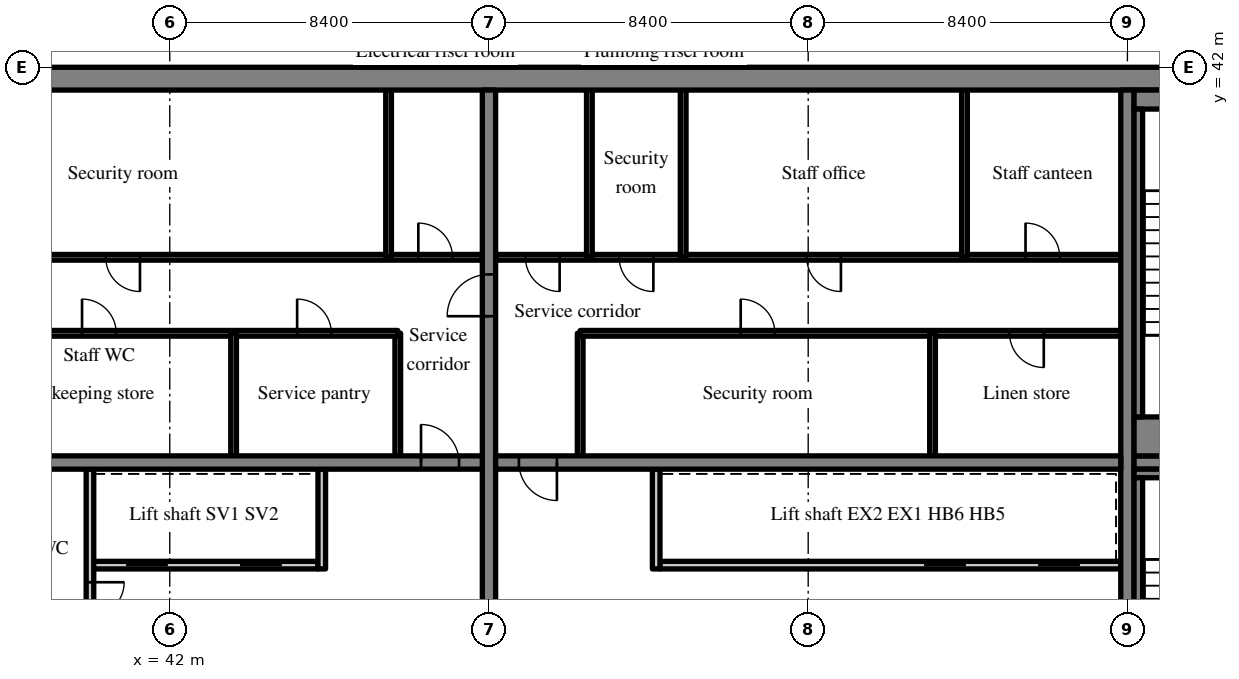
"""IFC4 building model, lengths in metres.
Left out: names, types, materials, properties, quantities, classifications, styles, units other than length and angle.
Written with IfcOpenShell. Run it as: python <this file> out.ifc"""

import sys

from ifc_helpers import new_model, si_unit, direction, frame, frame_2d, origin, place, context, subcontext, project, spatial, rectangle, extrude, source, transform, mapped, element, fill, save


model = new_model("IFC4")
c1 = context("Model", 3, precision=1e-05, world=origin(), true_north=direction((0.0, 1.0)))
c2 = subcontext(c1, "Body", "Model", "MODEL_VIEW")
j1 = project(units=[si_unit("LENGTHUNIT", "METRE"), si_unit("PLANEANGLEUNIT", "RADIAN")], contexts=[c1])
p1 = place(None, origin())
s1 = spatial("IfcSite", under=j1, at=p1, CompositionType="ELEMENT")
p2 = place(p1, origin())
s2 = spatial("IfcBuilding", under=s1, at=p2, CompositionType="ELEMENT")
p3 = place(p2, frame((0.0, 0.0, 237.4)))
s3 = spatial("IfcBuildingStorey", under=s2, at=p3, CompositionType="ELEMENT", Elevation=237.4)
m1 = source(origin(), c2, "Body", "SweptSolid", [
    extrude(rectangle(XDim=50.4, YDim=0.6, at=frame_2d((25.2, 0.0))), origin(), (0.0, 0.0, 1.0), 3.62),
])
p4 = place(p3, frame((25.2, 41.7, 0.0), z_axis=(0.0, 0.0, 1.0), x_axis=(1.0, 0.0, 0.0)))
e1 = element("IfcWall", 1, at=p4, inside=s3, PredefinedType="SHEAR", context=c2, shape_type="MappedRepresentation", body=[
    mapped(m1, transform((0.0, 0.0, 0.0), scale=1.0)),
])
m2 = source(origin(), c2, "Body", "SweptSolid", [
    extrude(rectangle(XDim=18.8, YDim=0.35, at=frame_2d((9.4, 0.0))), origin(), (0.0, 0.0, 1.0), 3.62),
])
p5 = place(p3, frame((50.4, 22.6, 0.0), z_axis=(0.0, 0.0, 1.0), x_axis=(0.0, 1.0, 0.0)))
e2 = element("IfcWall", 2, at=p5, inside=s3, PredefinedType="SHEAR", context=c2, shape_type="MappedRepresentation", body=[
    mapped(m2, transform((0.0, 0.0, 0.0), scale=1.0)),
])
m3 = source(origin(), c2, "Body", "SweptSolid", [
    extrude(rectangle(XDim=1.1, YDim=2.1, at=frame_2d((0.55, 1.05))), frame((0.0, 0.185, 0.0), z_axis=(0.0, -1.0, 0.0), x_axis=(1.0, 0.0, 0.0)), (0.0, 0.0, 1.0), 0.37),
])
p6 = place(p5, frame((12.85, 0.0, 0.0)))
e3 = element("IfcOpeningElement", 3, at=p6, cuts=e2, PredefinedType="OPENING", context=c2, shape_type="MappedRepresentation", body=[
    mapped(m3, transform((0.0, 0.0, 0.0), scale=1.0)),
])
p7 = place(p3, frame((67.2, 22.6, 0.0), z_axis=(0.0, 0.0, 1.0), x_axis=(0.0, 1.0, 0.0)))
e4 = element("IfcWall", 4, at=p7, inside=s3, PredefinedType="SHEAR", context=c2, shape_type="MappedRepresentation", body=[
    mapped(m2, transform((0.0, 0.0, 0.0), scale=1.0)),
])
m4 = source(origin(), c2, "Body", "SweptSolid", [
    extrude(rectangle(XDim=16.45, YDim=0.35, at=frame_2d((8.225, 0.0))), origin(), (0.0, 0.0, 1.0), 3.62),
])
p8 = place(p3, frame((33.775, 31.6, 0.0), z_axis=(0.0, 0.0, 1.0), x_axis=(1.0, 0.0, 0.0)))
e5 = element("IfcWall", 5, at=p8, inside=s3, PredefinedType="SHEAR", context=c2, shape_type="MappedRepresentation", body=[
    mapped(m4, transform((0.0, 0.0, 0.0), scale=1.0)),
])
m5 = source(origin(), c2, "Body", "SweptSolid", [
    extrude(rectangle(XDim=1.0, YDim=2.1, at=frame_2d((0.5, 1.05))), frame((0.0, 0.185, 0.0), z_axis=(0.0, -1.0, 0.0), x_axis=(1.0, 0.0, 0.0)), (0.0, 0.0, 1.0), 0.37),
])
p9 = place(p8, frame((14.837, 0.0, 0.0)))
e6 = element("IfcOpeningElement", 6, at=p9, cuts=e5, PredefinedType="OPENING", context=c2, shape_type="MappedRepresentation", body=[
    mapped(m5, transform((0.0, 0.0, 0.0), scale=1.0)),
])
m6 = source(origin(), c2, "Body", "SweptSolid", [
    extrude(rectangle(XDim=16.45, YDim=0.35, at=frame_2d((8.225, 0.0))), origin(), (0.0, 0.0, 1.0), 3.62),
])
p10 = place(p3, frame((50.575, 31.6, 0.0), z_axis=(0.0, 0.0, 1.0), x_axis=(1.0, 0.0, 0.0)))
e7 = element("IfcWall", 7, at=p10, inside=s3, PredefinedType="SHEAR", context=c2, shape_type="MappedRepresentation", body=[
    mapped(m6, transform((0.0, 0.0, 0.0), scale=1.0)),
])
p11 = place(p10, frame((0.613, 0.0, 0.0)))
e8 = element("IfcOpeningElement", 8, at=p11, cuts=e7, PredefinedType="OPENING", context=c2, shape_type="MappedRepresentation", body=[
    mapped(m5, transform((0.0, 0.0, 0.0), scale=1.0)),
])
m7 = source(origin(), c2, "Body", "SweptSolid", [
    extrude(rectangle(XDim=7.625, YDim=0.35, at=frame_2d((3.812, 0.0))), origin(), (0.0, 0.0, 1.0), 3.62),
])
p12 = place(p3, frame((67.375, 31.6, 0.0), z_axis=(0.0, 0.0, 1.0), x_axis=(1.0, 0.0, 0.0)))
e9 = element("IfcWall", 9, at=p12, inside=s3, PredefinedType="SHEAR", context=c2, shape_type="MappedRepresentation", body=[
    mapped(m7, transform((0.0, 0.0, 0.0), scale=1.0)),
])
p13 = place(p12, frame((5.8, 0.0, 0.0)))
e10 = element("IfcOpeningElement", 10, at=p13, cuts=e9, PredefinedType="OPENING", context=c2, shape_type="MappedRepresentation", body=[
    mapped(m3, transform((0.0, 0.0, 0.0), scale=1.0)),
])
m8 = source(origin(), c2, "Body", "SweptSolid", [
    extrude(rectangle(XDim=6.0, YDim=0.2, at=frame_2d((3.0, 0.0))), origin(), (0.0, 0.0, 1.0), 3.62),
])
p14 = place(p3, frame((39.9, 28.9, 0.0), z_axis=(0.0, 0.0, 1.0), x_axis=(1.0, 0.0, 0.0)))
e11 = element("IfcWall", 11, at=p14, inside=s3, PredefinedType="SOLIDWALL", context=c2, shape_type="MappedRepresentation", body=[
    mapped(m8, transform((0.0, 0.0, 0.0), scale=1.0)),
])
m9 = source(origin(), c2, "Body", "SweptSolid", [
    extrude(rectangle(XDim=1.1, YDim=2.1, at=frame_2d((0.55, 1.05))), frame((0.0, 0.11, 0.0), z_axis=(0.0, -1.0, 0.0), x_axis=(1.0, 0.0, 0.0)), (0.0, 0.0, 1.0), 0.22),
])
p15 = place(p14, frame((0.95, 0.0, 0.0)))
e12 = element("IfcOpeningElement", 12, at=p15, cuts=e11, PredefinedType="OPENING", context=c2, shape_type="MappedRepresentation", body=[
    mapped(m9, transform((0.0, 0.0, 0.0), scale=1.0)),
])
p16 = place(p14, frame((3.95, 0.0, 0.0)))
e13 = element("IfcOpeningElement", 13, at=p16, cuts=e11, PredefinedType="OPENING", context=c2, shape_type="MappedRepresentation", body=[
    mapped(m9, transform((0.0, 0.0, 0.0), scale=1.0)),
])
m10 = source(origin(), c2, "Body", "SweptSolid", [
    extrude(rectangle(XDim=8.825, YDim=0.2, at=frame_2d((4.413, 0.0))), origin(), (0.0, 0.0, 1.0), 3.62),
])
p17 = place(p3, frame((39.9, 22.6, 0.0), z_axis=(0.0, 0.0, 1.0), x_axis=(0.0, 1.0, 0.0)))
e14 = element("IfcWall", 14, at=p17, inside=s3, PredefinedType="PARTITIONING", context=c2, shape_type="MappedRepresentation", body=[
    mapped(m10, transform((0.0, 0.0, 0.0), scale=1.0)),
])
m11 = source(origin(), c2, "Body", "SweptSolid", [
    extrude(rectangle(XDim=0.9, YDim=2.1, at=frame_2d((0.45, 1.05))), frame((0.0, 0.11, 0.0), z_axis=(0.0, -1.0, 0.0), x_axis=(1.0, 0.0, 0.0)), (0.0, 0.0, 1.0), 0.22),
])
p18 = place(p17, frame((3.15, 0.0, 0.0)))
e15 = element("IfcOpeningElement", 15, at=p18, cuts=e14, PredefinedType="OPENING", context=c2, shape_type="MappedRepresentation", body=[
    mapped(m11, transform((0.0, 0.0, 0.0), scale=1.0)),
])
p19 = place(p17, frame((4.95, 0.0, 0.0)))
e16 = element("IfcOpeningElement", 16, at=p19, cuts=e14, PredefinedType="OPENING", context=c2, shape_type="MappedRepresentation", body=[
    mapped(m11, transform((0.0, 0.0, 0.0), scale=1.0)),
])
m12 = source(origin(), c2, "Body", "SweptSolid", [
    extrude(rectangle(XDim=2.625, YDim=0.2, at=frame_2d((1.312, 0.0))), origin(), (0.0, 0.0, 1.0), 3.62),
])
p20 = place(p3, frame((46.0, 28.8, 0.0), z_axis=(0.0, 0.0, 1.0), x_axis=(0.0, 1.0, 0.0)))
e17 = element("IfcWall", 17, at=p20, inside=s3, PredefinedType="SOLIDWALL", context=c2, shape_type="MappedRepresentation", body=[
    mapped(m12, transform((0.0, 0.0, 0.0), scale=1.0)),
])
m13 = source(origin(), c2, "Body", "SweptSolid", [
    extrude(rectangle(XDim=3.225, YDim=0.15, at=frame_2d((1.613, 0.0))), origin(), (0.0, 0.0, 1.0), 3.62),
])
p21 = place(p3, frame((48.0, 31.775, 0.0), z_axis=(0.0, 0.0, 1.0), x_axis=(0.0, 1.0, 0.0)))
e18 = element("IfcWall", 18, at=p21, inside=s3, PredefinedType="PARTITIONING", context=c2, shape_type="MappedRepresentation", body=[
    mapped(m13, transform((0.0, 0.0, 0.0), scale=1.0)),
])
m14 = source(origin(), c2, "Body", "SweptSolid", [
    extrude(rectangle(XDim=14.225, YDim=0.15, at=frame_2d((7.113, 0.0))), origin(), (0.0, 0.0, 1.0), 3.62),
])
p22 = place(p3, frame((33.775, 35.0, 0.0), z_axis=(0.0, 0.0, 1.0), x_axis=(1.0, 0.0, 0.0)))
e19 = element("IfcWall", 19, at=p22, inside=s3, PredefinedType="PARTITIONING", context=c2, shape_type="MappedRepresentation", body=[
    mapped(m14, transform((0.0, 0.0, 0.0), scale=1.0)),
])
m15 = source(origin(), c2, "Body", "SweptSolid", [
    extrude(rectangle(XDim=0.9, YDim=2.1, at=frame_2d((0.45, 1.05))), frame((0.0, 0.085, 0.0), z_axis=(0.0, -1.0, 0.0), x_axis=(1.0, 0.0, 0.0)), (0.0, 0.0, 1.0), 0.17),
])
p23 = place(p22, frame((0.965, 0.0, 0.0)))
e20 = element("IfcOpeningElement", 20, at=p23, cuts=e19, PredefinedType="OPENING", context=c2, shape_type="MappedRepresentation", body=[
    mapped(m15, transform((0.0, 0.0, 0.0), scale=1.0)),
])
p24 = place(p22, frame((5.917, 0.0, 0.0)))
e21 = element("IfcOpeningElement", 21, at=p24, cuts=e19, PredefinedType="OPENING", context=c2, shape_type="MappedRepresentation", body=[
    mapped(m15, transform((0.0, 0.0, 0.0), scale=1.0)),
])
p25 = place(p22, frame((11.577, 0.0, 0.0)))
e22 = element("IfcOpeningElement", 22, at=p25, cuts=e19, PredefinedType="OPENING", context=c2, shape_type="MappedRepresentation", body=[
    mapped(m15, transform((0.0, 0.0, 0.0), scale=1.0)),
])
m16 = source(origin(), c2, "Body", "SweptSolid", [
    extrude(rectangle(XDim=16.45, YDim=0.15, at=frame_2d((8.225, 0.0))), origin(), (0.0, 0.0, 1.0), 3.62),
])
p26 = place(p3, frame((33.775, 37.0, 0.0), z_axis=(0.0, 0.0, 1.0), x_axis=(1.0, 0.0, 0.0)))
e23 = element("IfcWall", 23, at=p26, inside=s3, PredefinedType="PARTITIONING", context=c2, shape_type="MappedRepresentation", body=[
    mapped(m16, transform((0.0, 0.0, 0.0), scale=1.0)),
])
p27 = place(p26, frame((6.541, 0.0, 0.0)))
e24 = element("IfcOpeningElement", 24, at=p27, cuts=e23, PredefinedType="OPENING", context=c2, shape_type="MappedRepresentation", body=[
    mapped(m15, transform((0.0, 0.0, 0.0), scale=1.0)),
])
p28 = place(p26, frame((14.766, 0.0, 0.0)))
e25 = element("IfcOpeningElement", 25, at=p28, cuts=e23, PredefinedType="OPENING", context=c2, shape_type="MappedRepresentation", body=[
    mapped(m15, transform((0.0, 0.0, 0.0), scale=1.0)),
])
p29 = place(p3, frame((43.68, 31.775, 0.0), z_axis=(0.0, 0.0, 1.0), x_axis=(0.0, 1.0, 0.0)))
e26 = element("IfcWall", 26, at=p29, inside=s3, PredefinedType="PARTITIONING", context=c2, shape_type="MappedRepresentation", body=[
    mapped(m13, transform((0.0, 0.0, 0.0), scale=1.0)),
])
m17 = source(origin(), c2, "Body", "SweptSolid", [
    extrude(rectangle(XDim=4.4, YDim=0.15, at=frame_2d((2.2, 0.0))), origin(), (0.0, 0.0, 1.0), 3.62),
])
p30 = place(p3, frame((47.758, 37.0, 0.0), z_axis=(0.0, 0.0, 1.0), x_axis=(0.0, 1.0, 0.0)))
e27 = element("IfcWall", 27, at=p30, inside=s3, PredefinedType="PARTITIONING", context=c2, shape_type="MappedRepresentation", body=[
    mapped(m17, transform((0.0, 0.0, 0.0), scale=1.0)),
])
m18 = source(origin(), c2, "Body", "SweptSolid", [
    extrude(rectangle(XDim=12.125, YDim=0.2, at=frame_2d((6.062, 0.0))), origin(), (0.0, 0.0, 1.0), 3.62),
])
p31 = place(p3, frame((67.025, 28.9, 0.0), z_axis=(0.0, 0.0, 1.0), x_axis=(-1.0, 0.0, 0.0)))
e28 = element("IfcWall", 28, at=p31, inside=s3, PredefinedType="SOLIDWALL", context=c2, shape_type="MappedRepresentation", body=[
    mapped(m18, transform((0.0, 0.0, 0.0), scale=1.0)),
])
p32 = place(p31, frame((1.075, 0.0, 0.0)))
e29 = element("IfcOpeningElement", 29, at=p32, cuts=e28, PredefinedType="OPENING", context=c2, shape_type="MappedRepresentation", body=[
    mapped(m9, transform((0.0, 0.0, 0.0), scale=1.0)),
])
p33 = place(p31, frame((4.075, 0.0, 0.0)))
e30 = element("IfcOpeningElement", 30, at=p33, cuts=e28, PredefinedType="OPENING", context=c2, shape_type="MappedRepresentation", body=[
    mapped(m9, transform((0.0, 0.0, 0.0), scale=1.0)),
])
p34 = place(p3, frame((54.8, 28.8, 0.0), z_axis=(0.0, 0.0, 1.0), x_axis=(0.0, 1.0, 0.0)))
e31 = element("IfcWall", 31, at=p34, inside=s3, PredefinedType="SOLIDWALL", context=c2, shape_type="MappedRepresentation", body=[
    mapped(m12, transform((0.0, 0.0, 0.0), scale=1.0)),
])
p35 = place(p3, frame((52.8, 31.775, 0.0), z_axis=(0.0, 0.0, 1.0), x_axis=(0.0, 1.0, 0.0)))
e32 = element("IfcWall", 32, at=p35, inside=s3, PredefinedType="PARTITIONING", context=c2, shape_type="MappedRepresentation", body=[
    mapped(m13, transform((0.0, 0.0, 0.0), scale=1.0)),
])
m19 = source(origin(), c2, "Body", "SweptSolid", [
    extrude(rectangle(XDim=14.225, YDim=0.15, at=frame_2d((7.112, 0.0))), origin(), (0.0, 0.0, 1.0), 3.62),
])
p36 = place(p3, frame((67.025, 35.0, 0.0), z_axis=(0.0, 0.0, 1.0), x_axis=(-1.0, 0.0, 0.0)))
e33 = element("IfcWall", 33, at=p36, inside=s3, PredefinedType="PARTITIONING", context=c2, shape_type="MappedRepresentation", body=[
    mapped(m19, transform((0.0, 0.0, 0.0), scale=1.0)),
])
p37 = place(p36, frame((2.026, 0.0, 0.0)))
e34 = element("IfcOpeningElement", 34, at=p37, cuts=e33, PredefinedType="OPENING", context=c2, shape_type="MappedRepresentation", body=[
    mapped(m15, transform((0.0, 0.0, 0.0), scale=1.0)),
])
p38 = place(p36, frame((9.101, 0.0, 0.0)))
e35 = element("IfcOpeningElement", 35, at=p38, cuts=e33, PredefinedType="OPENING", context=c2, shape_type="MappedRepresentation", body=[
    mapped(m15, transform((0.0, 0.0, 0.0), scale=1.0)),
])
m20 = source(origin(), c2, "Body", "SweptSolid", [
    extrude(rectangle(XDim=16.45, YDim=0.15, at=frame_2d((8.225, 0.0))), origin(), (0.0, 0.0, 1.0), 3.62),
])
p39 = place(p3, frame((67.025, 37.0, 0.0), z_axis=(0.0, 0.0, 1.0), x_axis=(-1.0, 0.0, 0.0)))
e36 = element("IfcWall", 36, at=p39, inside=s3, PredefinedType="PARTITIONING", context=c2, shape_type="MappedRepresentation", body=[
    mapped(m20, transform((0.0, 0.0, 0.0), scale=1.0)),
])
p40 = place(p39, frame((1.606, 0.0, 0.0)))
e37 = element("IfcOpeningElement", 37, at=p40, cuts=e36, PredefinedType="OPENING", context=c2, shape_type="MappedRepresentation", body=[
    mapped(m15, transform((0.0, 0.0, 0.0), scale=1.0)),
])
p41 = place(p39, frame((7.364, 0.0, 0.0)))
e38 = element("IfcOpeningElement", 38, at=p41, cuts=e36, PredefinedType="OPENING", context=c2, shape_type="MappedRepresentation", body=[
    mapped(m15, transform((0.0, 0.0, 0.0), scale=1.0)),
])
p42 = place(p39, frame((12.299, 0.0, 0.0)))
e39 = element("IfcOpeningElement", 39, at=p42, cuts=e36, PredefinedType="OPENING", context=c2, shape_type="MappedRepresentation", body=[
    mapped(m15, transform((0.0, 0.0, 0.0), scale=1.0)),
])
p43 = place(p39, frame((14.766, 0.0, 0.0)))
e40 = element("IfcOpeningElement", 40, at=p43, cuts=e36, PredefinedType="OPENING", context=c2, shape_type="MappedRepresentation", body=[
    mapped(m15, transform((0.0, 0.0, 0.0), scale=1.0)),
])
p44 = place(p3, frame((62.072, 31.775, 0.0), z_axis=(0.0, 0.0, 1.0), x_axis=(0.0, 1.0, 0.0)))
e41 = element("IfcWall", 41, at=p44, inside=s3, PredefinedType="PARTITIONING", context=c2, shape_type="MappedRepresentation", body=[
    mapped(m13, transform((0.0, 0.0, 0.0), scale=1.0)),
])
for number, where, z_axis, x_axis in (
    (42, (62.912, 37.0, 0.0), (0.0, 0.0, 1.0), (0.0, 1.0, 0.0)),
    (43, (55.51, 37.0, 0.0), (0.0, 0.0, 1.0), (0.0, 1.0, 0.0)),
    (44, (53.042, 37.0, 0.0), (0.0, 0.0, 1.0), (0.0, 1.0, 0.0)),
):
    element("IfcWall", number, at=place(p3, frame(where, z_axis=z_axis, x_axis=x_axis)), inside=s3, PredefinedType="PARTITIONING", context=c2, shape_type="MappedRepresentation", body=[
        mapped(m17, transform((0.0, 0.0, 0.0), scale=1.0)),
    ])
m21 = source(origin(), c2, "Body", "SweptSolid", [
    extrude(rectangle(XDim=4.875, YDim=0.225, at=frame_2d((2.438, 0.0))), origin(), (0.0, 0.0, 1.0), 3.62),
])
p45 = place(p3, frame((67.375, 31.312, 0.0), z_axis=(0.0, 0.0, 1.0), x_axis=(1.0, 0.0, 0.0)))
e45 = element("IfcWall", 45, at=p45, inside=s3, PredefinedType="SOLIDWALL", context=c2, shape_type="MappedRepresentation", body=[
    mapped(m21, transform((0.0, 0.0, 0.0), scale=1.0)),
])
m22 = source(origin(), c2, "Body", "SweptSolid", [
    extrude(rectangle(XDim=8.1, YDim=0.225, at=frame_2d((4.05, 0.0))), origin(), (0.0, 0.0, 1.0), 3.62),
])
p46 = place(p3, frame((67.487, 23.1, 0.0), z_axis=(0.0, 0.0, 1.0), x_axis=(0.0, 1.0, 0.0)))
e46 = element("IfcWall", 46, at=p46, inside=s3, PredefinedType="SOLIDWALL", context=c2, shape_type="MappedRepresentation", body=[
    mapped(m22, transform((0.0, 0.0, 0.0), scale=1.0)),
])
m23 = source(origin(), c2, "Body", "SweptSolid", [
    extrude(rectangle(XDim=4.875, YDim=0.5, at=frame_2d((2.438, 0.0))), origin(), (0.0, 0.0, 1.0), 3.62),
])
p47 = place(p3, frame((67.375, 41.15, 0.0), z_axis=(0.0, 0.0, 1.0), x_axis=(1.0, 0.0, 0.0)))
e47 = element("IfcWall", 47, at=p47, inside=s3, PredefinedType="SOLIDWALL", context=c2, shape_type="MappedRepresentation", body=[
    mapped(m23, transform((0.0, 0.0, 0.0), scale=1.0)),
])
m24 = source(origin(), c2, "Body", "SweptSolid", [
    extrude(rectangle(XDim=4.875, YDim=1.025, at=frame_2d((2.438, 0.0))), origin(), (0.0, 0.0, 1.0), 3.62),
])
p48 = place(p3, frame((67.375, 32.287, 0.0), z_axis=(0.0, 0.0, 1.0), x_axis=(1.0, 0.0, 0.0)))
e48 = element("IfcWall", 48, at=p48, inside=s3, PredefinedType="SOLIDWALL", context=c2, shape_type="MappedRepresentation", body=[
    mapped(m24, transform((0.0, 0.0, 0.0), scale=1.0)),
])
p49 = place(p3, frame((67.487, 32.8, 0.0), z_axis=(0.0, 0.0, 1.0), x_axis=(0.0, 1.0, 0.0)))
e49 = element("IfcWall", 49, at=p49, inside=s3, PredefinedType="SOLIDWALL", context=c2, shape_type="MappedRepresentation", body=[
    mapped(m22, transform((0.0, 0.0, 0.0), scale=1.0)),
])
m25 = source(origin(), c2, "Body", "SweptSolid", [
    extrude(rectangle(XDim=1.0, YDim=2.1, at=frame_2d((0.5, 1.05))), frame((0.0, 0.025, 0.0), z_axis=(0.0, -1.0, 0.0), x_axis=(1.0, 0.0, 0.0)), (0.0, 0.0, 1.0), 0.05),
])
p50 = place(p9, origin())
e50 = element("IfcDoor", 50, at=p50, inside=s3, OperationType="SINGLE_SWING_LEFT", PredefinedType="DOOR", context=c2, shape_type="MappedRepresentation", body=[
    mapped(m25, transform((0.0, 0.0, 0.0), scale=1.0)),
])
fill(e6, e50)
m26 = source(origin(), c2, "Body", "SweptSolid", [
    extrude(rectangle(XDim=1.1, YDim=2.1, at=frame_2d((0.55, 1.05))), frame((0.0, 0.025, 0.0), z_axis=(0.0, -1.0, 0.0), x_axis=(1.0, 0.0, 0.0)), (0.0, 0.0, 1.0), 0.05),
])
p51 = place(p15, origin())
e51 = element("IfcDoor", 51, at=p51, inside=s3, OperationType="SLIDING_TO_LEFT", PredefinedType="DOOR", context=c2, shape_type="MappedRepresentation", body=[
    mapped(m26, transform((0.0, 0.0, 0.0), scale=1.0)),
])
fill(e12, e51)
p52 = place(p16, origin())
e52 = element("IfcDoor", 52, at=p52, inside=s3, OperationType="SLIDING_TO_RIGHT", PredefinedType="DOOR", context=c2, shape_type="MappedRepresentation", body=[
    mapped(m26, transform((0.0, 0.0, 0.0), scale=1.0)),
])
fill(e13, e52)
m27 = source(origin(), c2, "Body", "SweptSolid", [
    extrude(rectangle(XDim=0.9, YDim=2.1, at=frame_2d((0.45, 1.05))), frame((0.0, 0.025, 0.0), z_axis=(0.0, -1.0, 0.0), x_axis=(1.0, 0.0, 0.0)), (0.0, 0.0, 1.0), 0.05),
])
p53 = place(p19, origin())
e53 = element("IfcDoor", 53, at=p53, inside=s3, OperationType="SINGLE_SWING_RIGHT", PredefinedType="DOOR", context=c2, shape_type="MappedRepresentation", body=[
    mapped(m27, transform((0.0, 0.0, 0.0), scale=1.0)),
])
fill(e16, e53)
p54 = place(p24, origin())
e54 = element("IfcDoor", 54, at=p54, inside=s3, OperationType="SINGLE_SWING_LEFT", PredefinedType="DOOR", context=c2, shape_type="MappedRepresentation", body=[
    mapped(m27, transform((0.0, 0.0, 0.0), scale=1.0)),
])
fill(e21, e54)
p55 = place(p25, origin())
e55 = element("IfcDoor", 55, at=p55, inside=s3, OperationType="SINGLE_SWING_LEFT", PredefinedType="DOOR", context=c2, shape_type="MappedRepresentation", body=[
    mapped(m27, transform((0.0, 0.0, 0.0), scale=1.0)),
])
fill(e22, e55)
p56 = place(p27, origin())
e56 = element("IfcDoor", 56, at=p56, inside=s3, OperationType="SINGLE_SWING_RIGHT", PredefinedType="DOOR", context=c2, shape_type="MappedRepresentation", body=[
    mapped(m27, transform((0.0, 0.0, 0.0), scale=1.0)),
])
fill(e24, e56)
p57 = place(p28, origin())
e57 = element("IfcDoor", 57, at=p57, inside=s3, OperationType="SINGLE_SWING_LEFT", PredefinedType="DOOR", context=c2, shape_type="MappedRepresentation", body=[
    mapped(m27, transform((0.0, 0.0, 0.0), scale=1.0)),
])
fill(e25, e57)
p58 = place(p11, origin())
e58 = element("IfcDoor", 58, at=p58, inside=s3, OperationType="SINGLE_SWING_RIGHT", PredefinedType="DOOR", context=c2, shape_type="MappedRepresentation", body=[
    mapped(m25, transform((0.0, 0.0, 0.0), scale=1.0)),
])
fill(e8, e58)
p59 = place(p32, origin())
e59 = element("IfcDoor", 59, at=p59, inside=s3, OperationType="SLIDING_TO_RIGHT", PredefinedType="DOOR", context=c2, shape_type="MappedRepresentation", body=[
    mapped(m26, transform((0.0, 0.0, 0.0), scale=1.0)),
])
fill(e29, e59)
p60 = place(p33, origin())
e60 = element("IfcDoor", 60, at=p60, inside=s3, OperationType="SLIDING_TO_LEFT", PredefinedType="DOOR", context=c2, shape_type="MappedRepresentation", body=[
    mapped(m26, transform((0.0, 0.0, 0.0), scale=1.0)),
])
fill(e30, e60)
p61 = place(p37, origin())
e61 = element("IfcDoor", 61, at=p61, inside=s3, OperationType="SINGLE_SWING_LEFT", PredefinedType="DOOR", context=c2, shape_type="MappedRepresentation", body=[
    mapped(m27, transform((0.0, 0.0, 0.0), scale=1.0)),
])
fill(e34, e61)
p62 = place(p38, origin())
e62 = element("IfcDoor", 62, at=p62, inside=s3, OperationType="SINGLE_SWING_RIGHT", PredefinedType="DOOR", context=c2, shape_type="MappedRepresentation", body=[
    mapped(m27, transform((0.0, 0.0, 0.0), scale=1.0)),
])
fill(e35, e62)
p63 = place(p40, origin())
e63 = element("IfcDoor", 63, at=p63, inside=s3, OperationType="SINGLE_SWING_RIGHT", PredefinedType="DOOR", context=c2, shape_type="MappedRepresentation", body=[
    mapped(m27, transform((0.0, 0.0, 0.0), scale=1.0)),
])
fill(e37, e63)
p64 = place(p41, origin())
e64 = element("IfcDoor", 64, at=p64, inside=s3, OperationType="SINGLE_SWING_LEFT", PredefinedType="DOOR", context=c2, shape_type="MappedRepresentation", body=[
    mapped(m27, transform((0.0, 0.0, 0.0), scale=1.0)),
])
fill(e38, e64)
p65 = place(p42, origin())
e65 = element("IfcDoor", 65, at=p65, inside=s3, OperationType="SINGLE_SWING_LEFT", PredefinedType="DOOR", context=c2, shape_type="MappedRepresentation", body=[
    mapped(m27, transform((0.0, 0.0, 0.0), scale=1.0)),
])
fill(e39, e65)
p66 = place(p43, origin())
e66 = element("IfcDoor", 66, at=p66, inside=s3, OperationType="SINGLE_SWING_LEFT", PredefinedType="DOOR", context=c2, shape_type="MappedRepresentation", body=[
    mapped(m27, transform((0.0, 0.0, 0.0), scale=1.0)),
])
fill(e40, e66)
p67 = place(p6, origin())
e67 = element("IfcDoor", 67, at=p67, inside=s3, OperationType="SINGLE_SWING_LEFT", PredefinedType="DOOR", context=c2, shape_type="MappedRepresentation", body=[
    mapped(m26, transform((0.0, 0.0, 0.0), scale=1.0)),
])
fill(e3, e67)
save(model, sys.argv[1])
